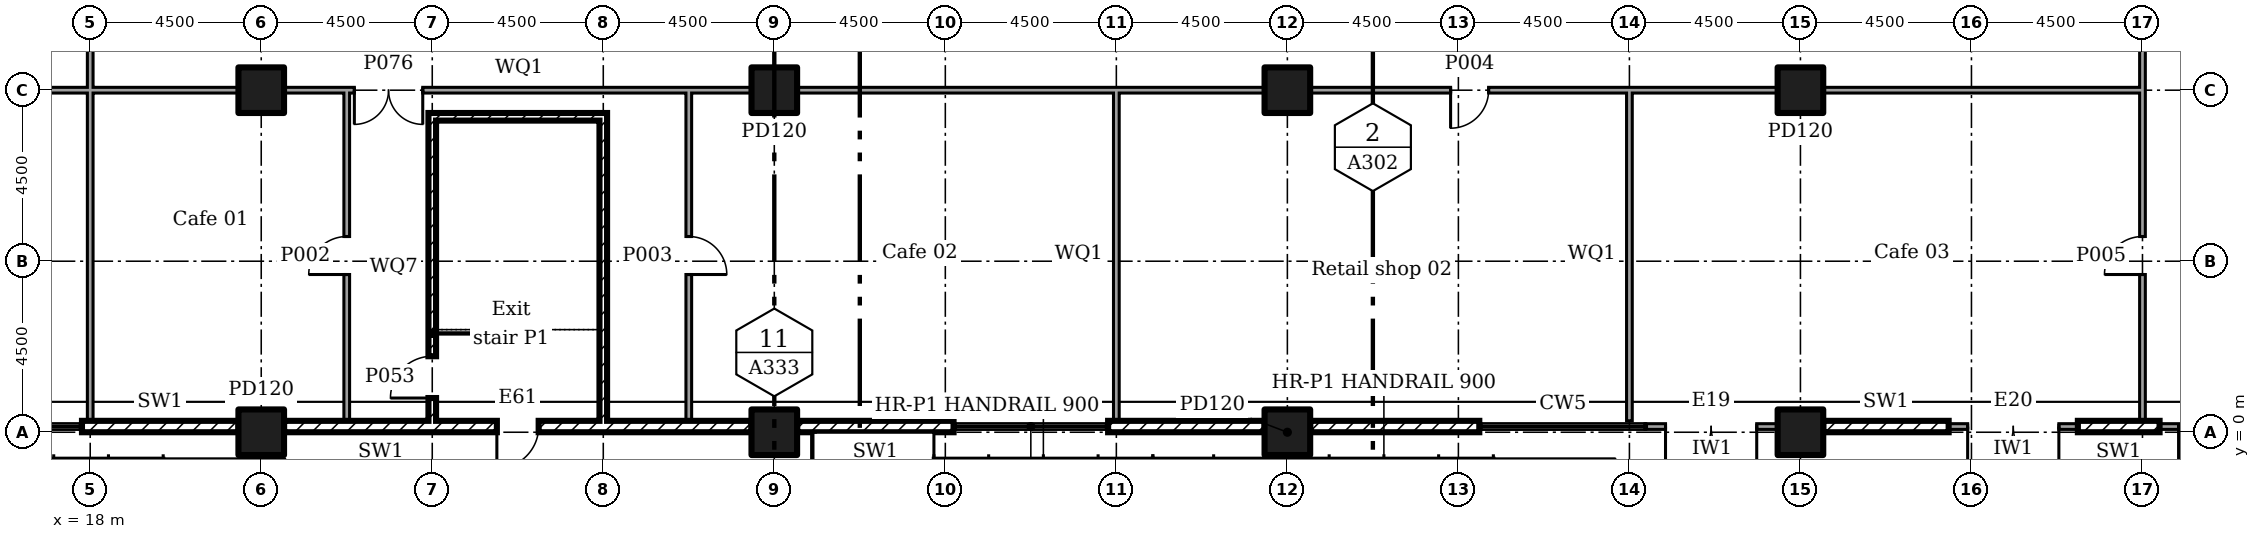
"""IFC4 building model, lengths in metres.
Left out: names, types, materials, properties, quantities, classifications, styles, units other than length and angle.
Written with IfcOpenShell. Run it as: python <this file> out.ifc"""

import sys

from ifc_helpers import new_model, si_unit, direction, frame, frame_2d, origin, origin_2d, place, context, subcontext, project, spatial, rectangle, extrude, element, fill, save


model = new_model("IFC4")
c1 = context("Model", 3, precision=1e-05, world=origin(), true_north=direction((0.0, 1.0)))
c2 = subcontext(c1, "Body", "Model", "MODEL_VIEW")
j1 = project(units=[si_unit("LENGTHUNIT", "METRE"), si_unit("PLANEANGLEUNIT", "RADIAN")], contexts=[c1])
p1 = place(None, origin())
s1 = spatial("IfcSite", under=j1, at=p1, CompositionType="ELEMENT")
p2 = place(p1, origin())
s2 = spatial("IfcBuilding", under=s1, at=p2, CompositionType="ELEMENT")
p3 = place(p2, origin())
s3 = spatial("IfcBuildingStorey", under=s2, at=p3, CompositionType="ELEMENT", Elevation=0.0)
for number, where in (
    (1, (22.5, 0.0, 0.0)),
    (2, (22.5, 9.0, 0.0)),
    (3, (36.0, 0.0, 0.0)),
    (4, (36.0, 9.0, 0.0)),
    (5, (49.5, 0.0, 0.0)),
    (6, (49.5, 9.0, 0.0)),
    (7, (63.0, 0.0, 0.0)),
    (8, (63.0, 9.0, 0.0)),
):
    element("IfcColumn", number, at=place(p3, frame(where)), inside=s3, PredefinedType="COLUMN", context=c2, shape_type="SweptSolid", body=[
        extrude(rectangle(XDim=1.2, YDim=1.2, at=origin_2d()), origin(), (0.0, 0.0, 1.0), 6.0),
    ])
p4 = place(p3, frame((17.783, 0.15, 0.0)))
e9 = element("IfcWall", 9, at=p4, inside=s3, PredefinedType="ELEMENTEDWALL", context=c2, shape_type="SweptSolid", body=[
    extrude(rectangle(XDim=4.116, YDim=0.3, at=frame_2d((2.058, 0.0))), origin(), (0.0, 0.0, 1.0), 5.55),
])
p5 = place(p3, frame((23.1, 0.15, 0.0)))
e10 = element("IfcWall", 10, at=p5, inside=s3, PredefinedType="ELEMENTEDWALL", context=c2, shape_type="SweptSolid", body=[
    extrude(rectangle(XDim=5.1, YDim=0.3, at=frame_2d((2.55, 0.0))), origin(), (0.0, 0.0, 1.0), 5.55),
])
p6 = place(p3, frame((28.2, 0.15, 0.0)))
e11 = element("IfcWall", 11, at=p6, inside=s3, PredefinedType="ELEMENTEDWALL", context=c2, shape_type="SweptSolid", body=[
    extrude(rectangle(XDim=2.1, YDim=0.3, at=frame_2d((1.05, 0.0))), origin(), (0.0, 0.0, 1.0), 5.55),
])
p7 = place(p6, frame((0.5, 0.0, 0.0)))
e12 = element("IfcOpeningElement", 12, at=p7, cuts=e11, PredefinedType="OPENING", context=c2, shape_type="SweptSolid", body=[
    extrude(rectangle(XDim=1.1, YDim=2.4, at=frame_2d((0.55, 1.2))), frame((0.0, 0.16, 0.0), z_axis=(0.0, -1.0, 0.0), x_axis=(1.0, 0.0, 0.0)), (0.0, 0.0, 1.0), 0.32),
])
p8 = place(p3, frame((30.3, 0.15, 0.0)))
e13 = element("IfcWall", 13, at=p8, inside=s3, PredefinedType="ELEMENTEDWALL", context=c2, shape_type="SweptSolid", body=[
    extrude(rectangle(XDim=5.1, YDim=0.3, at=frame_2d((2.55, 0.0))), origin(), (0.0, 0.0, 1.0), 5.55),
])
for number, where in (
    (14, (36.6, 0.15, 0.0)),
    (15, (44.783, 0.15, 0.0)),
):
    element("IfcWall", number, at=place(p3, frame(where)), inside=s3, PredefinedType="ELEMENTEDWALL", context=c2, shape_type="SweptSolid", body=[
        extrude(rectangle(XDim=4.116, YDim=0.3, at=frame_2d((2.058, 0.0))), origin(), (0.0, 0.0, 1.0), 5.55),
    ])
p9 = place(p3, frame((50.1, 0.15, 0.0)))
e16 = element("IfcWall", 16, at=p9, inside=s3, PredefinedType="ELEMENTEDWALL", context=c2, shape_type="SweptSolid", body=[
    extrude(rectangle(XDim=4.45, YDim=0.3, at=frame_2d((2.225, 0.0))), origin(), (0.0, 0.0, 1.0), 5.55),
])
p10 = place(p3, frame((58.95, 0.15, 0.0)))
e17 = element("IfcWall", 17, at=p10, inside=s3, PredefinedType="SOLIDWALL", context=c2, shape_type="SweptSolid", body=[
    extrude(rectangle(XDim=3.45, YDim=0.15, at=frame_2d((1.725, 0.0))), origin(), (0.0, 0.0, 1.0), 5.55),
])
p11 = place(p10, frame((0.5, 0.0, 0.0)))
e18 = element("IfcOpeningElement", 18, at=p11, cuts=e17, PredefinedType="OPENING", context=c2, shape_type="SweptSolid", body=[
    extrude(rectangle(XDim=2.4, YDim=2.7, at=frame_2d((1.2, 1.35))), frame((0.0, 0.085, 0.0), z_axis=(0.0, -1.0, 0.0), x_axis=(1.0, 0.0, 0.0)), (0.0, 0.0, 1.0), 0.17),
])
p12 = place(p3, frame((63.6, 0.15, 0.0)))
e19 = element("IfcWall", 19, at=p12, inside=s3, PredefinedType="ELEMENTEDWALL", context=c2, shape_type="SweptSolid", body=[
    extrude(rectangle(XDim=3.3, YDim=0.3, at=frame_2d((1.65, 0.0))), origin(), (0.0, 0.0, 1.0), 5.55),
])
p13 = place(p3, frame((66.9, 0.15, 0.0)))
e20 = element("IfcWall", 20, at=p13, inside=s3, PredefinedType="SOLIDWALL", context=c2, shape_type="SweptSolid", body=[
    extrude(rectangle(XDim=3.4, YDim=0.15, at=frame_2d((1.7, 0.0))), origin(), (0.0, 0.0, 1.0), 5.55),
])
p14 = place(p13, frame((0.5, 0.0, 0.0)))
e21 = element("IfcOpeningElement", 21, at=p14, cuts=e20, PredefinedType="OPENING", context=c2, shape_type="SweptSolid", body=[
    extrude(rectangle(XDim=2.4, YDim=2.7, at=frame_2d((1.2, 1.35))), frame((0.0, 0.085, 0.0), z_axis=(0.0, -1.0, 0.0), x_axis=(1.0, 0.0, 0.0)), (0.0, 0.0, 1.0), 0.17),
])
p15 = place(p3, frame((70.3, 0.15, 0.0)))
e22 = element("IfcWall", 22, at=p15, inside=s3, PredefinedType="ELEMENTEDWALL", context=c2, shape_type="SweptSolid", body=[
    extrude(rectangle(XDim=2.15, YDim=0.3, at=frame_2d((1.075, 0.0))), origin(), (0.0, 0.0, 1.0), 5.55),
])
p16 = place(p3, frame((72.45, 0.15, 0.0)))
e23 = element("IfcWall", 23, at=p16, inside=s3, PredefinedType="SOLIDWALL", context=c2, shape_type="SweptSolid", body=[
    extrude(rectangle(XDim=3.45, YDim=0.15, at=frame_2d((1.725, 0.0))), origin(), (0.0, 0.0, 1.0), 5.55),
])
p17 = place(p16, frame((0.5, 0.0, 0.0)))
e24 = element("IfcOpeningElement", 24, at=p17, cuts=e23, PredefinedType="OPENING", context=c2, shape_type="SweptSolid", body=[
    extrude(rectangle(XDim=2.4, YDim=2.7, at=frame_2d((1.2, 1.35))), frame((0.0, 0.085, 0.0), z_axis=(0.0, -1.0, 0.0), x_axis=(1.0, 0.0, 0.0)), (0.0, 0.0, 1.0), 0.17),
])
p18 = place(p3, frame((72.0, 0.3, 0.0), z_axis=(0.0, 0.0, 1.0), x_axis=(0.0, 1.0, 0.0)))
e25 = element("IfcWall", 25, at=p18, inside=s3, PredefinedType="PARTITIONING", context=c2, shape_type="SweptSolid", body=[
    extrude(rectangle(XDim=8.775, YDim=0.15, at=frame_2d((4.387, 0.0))), origin(), (0.0, 0.0, 1.0), 5.55),
])
p19 = place(p18, frame((3.85, 0.0, 0.0)))
e26 = element("IfcOpeningElement", 26, at=p19, cuts=e25, PredefinedType="OPENING", context=c2, shape_type="SweptSolid", body=[
    extrude(rectangle(XDim=1.0, YDim=2.1, at=frame_2d((0.5, 1.05))), frame((0.0, 0.085, 0.0), z_axis=(0.0, -1.0, 0.0), x_axis=(1.0, 0.0, 0.0)), (0.0, 0.0, 1.0), 0.17),
])
p20 = place(p3, frame((72.0, 9.0, 0.0), z_axis=(0.0, 0.0, 1.0), x_axis=(0.0, 1.0, 0.0)))
e27 = element("IfcWall", 27, at=p20, inside=s3, PredefinedType="PARTITIONING", context=c2, shape_type="SweptSolid", body=[
    extrude(rectangle(XDim=9.075, YDim=0.15, at=frame_2d((4.538, 0.0))), origin(), (0.0, 0.0, 1.0), 5.55),
])
p21 = place(p20, frame((3.6, 0.0, 0.0)))
e28 = element("IfcOpeningElement", 28, at=p21, cuts=e27, PredefinedType="OPENING", context=c2, shape_type="SweptSolid", body=[
    extrude(rectangle(XDim=1.8, YDim=2.1, at=frame_2d((0.9, 1.05))), frame((0.0, 0.085, 0.0), z_axis=(0.0, -1.0, 0.0), x_axis=(1.0, 0.0, 0.0)), (0.0, 0.0, 1.0), 0.17),
])
p22 = place(p3, frame((18.0, 0.3, 0.0), z_axis=(0.0, 0.0, 1.0), x_axis=(0.0, 1.0, 0.0)))
e29 = element("IfcWall", 29, at=p22, inside=s3, PredefinedType="PARTITIONING", context=c2, shape_type="SweptSolid", body=[
    extrude(rectangle(XDim=8.775, YDim=0.15, at=frame_2d((4.387, 0.0))), origin(), (0.0, 0.0, 1.0), 5.55),
])
p23 = place(p3, frame((9.595, 9.0, 0.0)))
e30 = element("IfcWall", 30, at=p23, inside=s3, PredefinedType="PARTITIONING", context=c2, shape_type="SweptSolid", body=[
    extrude(rectangle(XDim=8.48, YDim=0.15, at=frame_2d((4.24, 0.0))), origin(), (0.0, 0.0, 1.0), 5.55),
])
p24 = place(p23, frame((3.7, 0.0, 0.0)))
e31 = element("IfcOpeningElement", 31, at=p24, cuts=e30, PredefinedType="OPENING", context=c2, shape_type="SweptSolid", body=[
    extrude(rectangle(XDim=1.0, YDim=2.1, at=frame_2d((0.5, 1.05))), frame((0.0, 0.085, 0.0), z_axis=(0.0, -1.0, 0.0), x_axis=(1.0, 0.0, 0.0)), (0.0, 0.0, 1.0), 0.17),
])
p25 = place(p3, frame((24.75, 0.3, 0.0), z_axis=(0.0, 0.0, 1.0), x_axis=(0.0, 1.0, 0.0)))
e32 = element("IfcWall", 32, at=p25, inside=s3, PredefinedType="PARTITIONING", context=c2, shape_type="SweptSolid", body=[
    extrude(rectangle(XDim=8.775, YDim=0.15, at=frame_2d((4.387, 0.0))), origin(), (0.0, 0.0, 1.0), 5.55),
])
p26 = place(p25, frame((3.85, 0.0, 0.0)))
e33 = element("IfcOpeningElement", 33, at=p26, cuts=e32, PredefinedType="OPENING", context=c2, shape_type="SweptSolid", body=[
    extrude(rectangle(XDim=1.0, YDim=2.1, at=frame_2d((0.5, 1.05))), frame((0.0, 0.085, 0.0), z_axis=(0.0, -1.0, 0.0), x_axis=(1.0, 0.0, 0.0)), (0.0, 0.0, 1.0), 0.17),
])
p27 = place(p3, frame((18.075, 9.0, 0.0)))
e34 = element("IfcWall", 34, at=p27, inside=s3, PredefinedType="PARTITIONING", context=c2, shape_type="SweptSolid", body=[
    extrude(rectangle(XDim=3.83, YDim=0.15, at=frame_2d((1.915, 0.0))), origin(), (0.0, 0.0, 1.0), 5.55),
])
p28 = place(p3, frame((23.095, 9.0, 0.0)))
e35 = element("IfcWall", 35, at=p28, inside=s3, PredefinedType="PARTITIONING", context=c2, shape_type="SweptSolid", body=[
    extrude(rectangle(XDim=1.655, YDim=0.15, at=frame_2d((0.828, 0.0))), origin(), (0.0, 0.0, 1.0), 5.55),
])
p29 = place(p3, frame((33.75, 0.3, 0.0), z_axis=(0.0, 0.0, 1.0), x_axis=(0.0, 1.0, 0.0)))
e36 = element("IfcWall", 36, at=p29, inside=s3, PredefinedType="PARTITIONING", context=c2, shape_type="SweptSolid", body=[
    extrude(rectangle(XDim=8.775, YDim=0.15, at=frame_2d((4.387, 0.0))), origin(), (0.0, 0.0, 1.0), 5.55),
])
p30 = place(p29, frame((3.85, 0.0, 0.0)))
e37 = element("IfcOpeningElement", 37, at=p30, cuts=e36, PredefinedType="OPENING", context=c2, shape_type="SweptSolid", body=[
    extrude(rectangle(XDim=1.0, YDim=2.1, at=frame_2d((0.5, 1.05))), frame((0.0, 0.085, 0.0), z_axis=(0.0, -1.0, 0.0), x_axis=(1.0, 0.0, 0.0)), (0.0, 0.0, 1.0), 0.17),
])
p31 = place(p3, frame((24.825, 9.0, 0.0)))
e38 = element("IfcWall", 38, at=p31, inside=s3, PredefinedType="PARTITIONING", context=c2, shape_type="SweptSolid", body=[
    extrude(rectangle(XDim=8.925, YDim=0.15, at=frame_2d((4.462, 0.0))), origin(), (0.0, 0.0, 1.0), 5.55),
])
p32 = place(p31, frame((0.125, 0.0, 0.0)))
e39 = element("IfcOpeningElement", 39, at=p32, cuts=e38, PredefinedType="OPENING", context=c2, shape_type="SweptSolid", body=[
    extrude(rectangle(XDim=1.8, YDim=2.1, at=frame_2d((0.9, 1.05))), frame((0.0, 0.085, 0.0), z_axis=(0.0, -1.0, 0.0), x_axis=(1.0, 0.0, 0.0)), (0.0, 0.0, 1.0), 0.17),
])
p33 = place(p3, frame((27.0, 0.3, 0.0), z_axis=(0.0, 0.0, 1.0), x_axis=(0.0, 1.0, 0.0)))
e40 = element("IfcWall", 40, at=p33, inside=s3, PredefinedType="SOLIDWALL", context=c2, shape_type="SweptSolid", body=[
    extrude(rectangle(XDim=8.1, YDim=0.2, at=frame_2d((4.05, 0.0))), origin(), (0.0, 0.0, 1.0), 5.55),
])
p34 = place(p33, frame((0.6, 0.0, 0.0)))
e41 = element("IfcOpeningElement", 41, at=p34, cuts=e40, PredefinedType="OPENING", context=c2, shape_type="SweptSolid", body=[
    extrude(rectangle(XDim=1.1, YDim=2.1, at=frame_2d((0.55, 1.05))), frame((0.0, 0.11, 0.0), z_axis=(0.0, -1.0, 0.0), x_axis=(1.0, 0.0, 0.0)), (0.0, 0.0, 1.0), 0.22),
])
p35 = place(p3, frame((31.5, 0.3, 0.0), z_axis=(0.0, 0.0, 1.0), x_axis=(0.0, 1.0, 0.0)))
e42 = element("IfcWall", 42, at=p35, inside=s3, PredefinedType="SOLIDWALL", context=c2, shape_type="SweptSolid", body=[
    extrude(rectangle(XDim=8.1, YDim=0.2, at=frame_2d((4.05, 0.0))), origin(), (0.0, 0.0, 1.0), 5.55),
])
p36 = place(p3, frame((27.1, 8.3, 0.0)))
e43 = element("IfcWall", 43, at=p36, inside=s3, PredefinedType="SOLIDWALL", context=c2, shape_type="SweptSolid", body=[
    extrude(rectangle(XDim=4.3, YDim=0.2, at=frame_2d((2.15, 0.0))), origin(), (0.0, 0.0, 1.0), 5.55),
])
p37 = place(p3, frame((45.0, 0.3, 0.0), z_axis=(0.0, 0.0, 1.0), x_axis=(0.0, 1.0, 0.0)))
e44 = element("IfcWall", 44, at=p37, inside=s3, PredefinedType="PARTITIONING", context=c2, shape_type="SweptSolid", body=[
    extrude(rectangle(XDim=8.775, YDim=0.15, at=frame_2d((4.387, 0.0))), origin(), (0.0, 0.0, 1.0), 5.55),
])
p38 = place(p3, frame((33.825, 9.0, 0.0)))
e45 = element("IfcWall", 45, at=p38, inside=s3, PredefinedType="PARTITIONING", context=c2, shape_type="SweptSolid", body=[
    extrude(rectangle(XDim=1.58, YDim=0.15, at=frame_2d((0.79, 0.0))), origin(), (0.0, 0.0, 1.0), 5.55),
])
p39 = place(p3, frame((36.595, 9.0, 0.0)))
e46 = element("IfcWall", 46, at=p39, inside=s3, PredefinedType="PARTITIONING", context=c2, shape_type="SweptSolid", body=[
    extrude(rectangle(XDim=8.33, YDim=0.15, at=frame_2d((4.165, 0.0))), origin(), (0.0, 0.0, 1.0), 5.55),
])
p40 = place(p3, frame((58.5, 0.3, 0.0), z_axis=(0.0, 0.0, 1.0), x_axis=(0.0, 1.0, 0.0)))
e47 = element("IfcWall", 47, at=p40, inside=s3, PredefinedType="PARTITIONING", context=c2, shape_type="SweptSolid", body=[
    extrude(rectangle(XDim=8.775, YDim=0.15, at=frame_2d((4.387, 0.0))), origin(), (0.0, 0.0, 1.0), 5.55),
])
p41 = place(p3, frame((45.0, 9.0, 0.0)))
e48 = element("IfcWall", 48, at=p41, inside=s3, PredefinedType="PARTITIONING", context=c2, shape_type="SweptSolid", body=[
    extrude(rectangle(XDim=3.905, YDim=0.15, at=frame_2d((1.953, 0.0))), origin(), (0.0, 0.0, 1.0), 5.55),
])
p42 = place(p3, frame((50.095, 9.0, 0.0)))
e49 = element("IfcWall", 49, at=p42, inside=s3, PredefinedType="PARTITIONING", context=c2, shape_type="SweptSolid", body=[
    extrude(rectangle(XDim=8.405, YDim=0.15, at=frame_2d((4.203, 0.0))), origin(), (0.0, 0.0, 1.0), 5.55),
])
p43 = place(p42, frame((3.7, 0.0, 0.0)))
e50 = element("IfcOpeningElement", 50, at=p43, cuts=e49, PredefinedType="OPENING", context=c2, shape_type="SweptSolid", body=[
    extrude(rectangle(XDim=1.0, YDim=2.1, at=frame_2d((0.5, 1.05))), frame((0.0, 0.085, 0.0), z_axis=(0.0, -1.0, 0.0), x_axis=(1.0, 0.0, 0.0)), (0.0, 0.0, 1.0), 0.17),
])
p44 = place(p3, frame((58.575, 9.0, 0.0)))
e51 = element("IfcWall", 51, at=p44, inside=s3, PredefinedType="PARTITIONING", context=c2, shape_type="SweptSolid", body=[
    extrude(rectangle(XDim=3.83, YDim=0.15, at=frame_2d((1.915, 0.0))), origin(), (0.0, 0.0, 1.0), 5.55),
])
p45 = place(p3, frame((63.595, 9.0, 0.0)))
e52 = element("IfcWall", 52, at=p45, inside=s3, PredefinedType="PARTITIONING", context=c2, shape_type="SweptSolid", body=[
    extrude(rectangle(XDim=8.33, YDim=0.15, at=frame_2d((4.165, 0.0))), origin(), (0.0, 0.0, 1.0), 5.55),
])
p46 = place(p3, frame((18.0, 9.075, 0.0), z_axis=(0.0, 0.0, 1.0), x_axis=(0.0, 1.0, 0.0)))
e53 = element("IfcWall", 53, at=p46, inside=s3, PredefinedType="PARTITIONING", context=c2, shape_type="SweptSolid", body=[
    extrude(rectangle(XDim=9.0, YDim=0.15, at=frame_2d((4.5, 0.0))), origin(), (0.0, 0.0, 1.0), 5.55),
])
p47 = place(p46, frame((3.525, 0.0, 0.0)))
e54 = element("IfcOpeningElement", 54, at=p47, cuts=e53, PredefinedType="OPENING", context=c2, shape_type="SweptSolid", body=[
    extrude(rectangle(XDim=1.8, YDim=2.1, at=frame_2d((0.9, 1.05))), frame((0.0, 0.085, 0.0), z_axis=(0.0, -1.0, 0.0), x_axis=(1.0, 0.0, 0.0)), (0.0, 0.0, 1.0), 0.17),
])
p48 = place(p7, frame((1.1, 0.0, 0.0), x_axis=(-1.0, 0.0, 0.0)))
e55 = element("IfcDoor", 55, at=p48, inside=s3, OperationType="SINGLE_SWING_LEFT", PredefinedType="NOTDEFINED", context=c2, shape_type="SweptSolid", body=[
    extrude(rectangle(XDim=1.1, YDim=2.4, at=frame_2d((0.55, 1.2))), frame((0.0, 0.025, 0.0), z_axis=(0.0, -1.0, 0.0), x_axis=(1.0, 0.0, 0.0)), (0.0, 0.0, 1.0), 0.05),
])
fill(e12, e55)
p49 = place(p11, frame((2.4, 0.0, 0.0), x_axis=(-1.0, 0.0, 0.0)))
e56 = element("IfcDoor", 56, at=p49, inside=s3, OperationType="DOUBLE_DOOR_DOUBLE_SWING", PredefinedType="NOTDEFINED", context=c2, shape_type="SweptSolid", body=[
    extrude(rectangle(XDim=2.4, YDim=2.7, at=frame_2d((1.2, 1.35))), frame((0.0, 0.025, 0.0), z_axis=(0.0, -1.0, 0.0), x_axis=(1.0, 0.0, 0.0)), (0.0, 0.0, 1.0), 0.05),
])
fill(e18, e56)
p50 = place(p14, frame((2.4, 0.0, 0.0), x_axis=(-1.0, 0.0, 0.0)))
e57 = element("IfcDoor", 57, at=p50, inside=s3, OperationType="DOUBLE_DOOR_DOUBLE_SWING", PredefinedType="NOTDEFINED", context=c2, shape_type="SweptSolid", body=[
    extrude(rectangle(XDim=2.4, YDim=2.7, at=frame_2d((1.2, 1.35))), frame((0.0, 0.025, 0.0), z_axis=(0.0, -1.0, 0.0), x_axis=(1.0, 0.0, 0.0)), (0.0, 0.0, 1.0), 0.05),
])
fill(e21, e57)
p51 = place(p17, frame((2.4, 0.0, 0.0), x_axis=(-1.0, 0.0, 0.0)))
e58 = element("IfcDoor", 58, at=p51, inside=s3, OperationType="DOUBLE_DOOR_DOUBLE_SWING", PredefinedType="NOTDEFINED", context=c2, shape_type="SweptSolid", body=[
    extrude(rectangle(XDim=2.4, YDim=2.7, at=frame_2d((1.2, 1.35))), frame((0.0, 0.025, 0.0), z_axis=(0.0, -1.0, 0.0), x_axis=(1.0, 0.0, 0.0)), (0.0, 0.0, 1.0), 0.05),
])
fill(e24, e58)
p52 = place(p26, origin())
e59 = element("IfcDoor", 59, at=p52, inside=s3, OperationType="SINGLE_SWING_RIGHT", PredefinedType="DOOR", context=c2, shape_type="SweptSolid", body=[
    extrude(rectangle(XDim=1.0, YDim=2.1, at=frame_2d((0.5, 1.05))), frame((0.0, 0.025, 0.0), z_axis=(0.0, -1.0, 0.0), x_axis=(1.0, 0.0, 0.0)), (0.0, 0.0, 1.0), 0.05),
])
fill(e33, e59)
p53 = place(p30, frame((1.0, 0.0, 0.0), x_axis=(-1.0, 0.0, 0.0)))
e60 = element("IfcDoor", 60, at=p53, inside=s3, OperationType="SINGLE_SWING_LEFT", PredefinedType="DOOR", context=c2, shape_type="SweptSolid", body=[
    extrude(rectangle(XDim=1.0, YDim=2.1, at=frame_2d((0.5, 1.05))), frame((0.0, 0.025, 0.0), z_axis=(0.0, -1.0, 0.0), x_axis=(1.0, 0.0, 0.0)), (0.0, 0.0, 1.0), 0.05),
])
fill(e37, e60)
p54 = place(p43, frame((1.0, 0.0, 0.0), x_axis=(-1.0, 0.0, 0.0)))
e61 = element("IfcDoor", 61, at=p54, inside=s3, OperationType="SINGLE_SWING_LEFT", PredefinedType="DOOR", context=c2, shape_type="SweptSolid", body=[
    extrude(rectangle(XDim=1.0, YDim=2.1, at=frame_2d((0.5, 1.05))), frame((0.0, 0.025, 0.0), z_axis=(0.0, -1.0, 0.0), x_axis=(1.0, 0.0, 0.0)), (0.0, 0.0, 1.0), 0.05),
])
fill(e50, e61)
p55 = place(p19, origin())
e62 = element("IfcDoor", 62, at=p55, inside=s3, OperationType="SINGLE_SWING_RIGHT", PredefinedType="DOOR", context=c2, shape_type="SweptSolid", body=[
    extrude(rectangle(XDim=1.0, YDim=2.1, at=frame_2d((0.5, 1.05))), frame((0.0, 0.025, 0.0), z_axis=(0.0, -1.0, 0.0), x_axis=(1.0, 0.0, 0.0)), (0.0, 0.0, 1.0), 0.05),
])
fill(e26, e62)
p56 = place(p34, origin())
e63 = element("IfcDoor", 63, at=p56, inside=s3, OperationType="SINGLE_SWING_RIGHT", PredefinedType="DOOR", context=c2, shape_type="SweptSolid", body=[
    extrude(rectangle(XDim=1.1, YDim=2.1, at=frame_2d((0.55, 1.05))), frame((0.0, 0.025, 0.0), z_axis=(0.0, -1.0, 0.0), x_axis=(1.0, 0.0, 0.0)), (0.0, 0.0, 1.0), 0.05),
])
fill(e41, e63)
p57 = place(p32, frame((1.8, 0.0, 0.0), x_axis=(-1.0, 0.0, 0.0)))
e64 = element("IfcDoor", 64, at=p57, inside=s3, OperationType="DOUBLE_DOOR_SINGLE_SWING", PredefinedType="DOOR", context=c2, shape_type="SweptSolid", body=[
    extrude(rectangle(XDim=1.8, YDim=2.1, at=frame_2d((0.9, 1.05))), frame((0.0, 0.025, 0.0), z_axis=(0.0, -1.0, 0.0), x_axis=(1.0, 0.0, 0.0)), (0.0, 0.0, 1.0), 0.05),
])
fill(e39, e64)
save(model, sys.argv[1])
